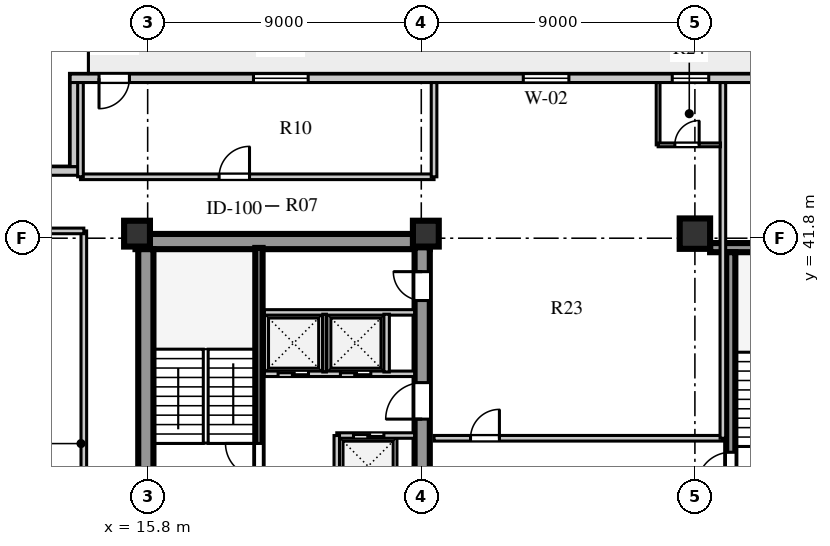
"""IFC4 building model, lengths in metres.
Left out: names, types, materials, properties, quantities, classifications, styles, units other than length and angle.
Written with IfcOpenShell. Run it as: python <this file> out.ifc"""

import sys

from ifc_helpers import new_model, si_unit, direction, frame, frame_2d, origin, origin_2d, place, context, subcontext, project, spatial, rectangle, extrude, element, fill, save


model = new_model("IFC4")
c1 = context("Model", 3, precision=1e-05, world=origin(), true_north=direction((0.0, 1.0)))
c2 = subcontext(c1, "Body", "Model", "MODEL_VIEW")
j1 = project(units=[si_unit("LENGTHUNIT", "METRE"), si_unit("PLANEANGLEUNIT", "RADIAN")], contexts=[c1])
p1 = place(None, origin())
s1 = spatial("IfcSite", under=j1, at=p1, CompositionType="ELEMENT")
p2 = place(p1, origin())
s2 = spatial("IfcBuilding", under=s1, at=p2, CompositionType="ELEMENT")
p3 = place(p2, frame((0.0, 0.0, 150.2)))
s3 = spatial("IfcBuildingStorey", under=s2, at=p3, CompositionType="ELEMENT", Elevation=150.2)
p4 = place(p3, frame((15.4, 41.69, 0.0), z_axis=(0.0, 0.0, 1.0), x_axis=(1.0, 0.0, 0.0)))
e1 = element("IfcWall", 1, at=p4, inside=s3, PredefinedType="SHEAR", context=c2, shape_type="SweptSolid", body=[
    extrude(rectangle(XDim=9.68, YDim=0.5, at=frame_2d((4.84, 0.0))), origin(), (0.0, 0.0, 1.0), 3.55),
])
p5 = place(p3, frame((15.74, 15.81, 0.0), z_axis=(0.0, 0.0, 1.0), x_axis=(0.0, 1.0, 0.0)))
e2 = element("IfcWall", 2, at=p5, inside=s3, PredefinedType="SHEAR", context=c2, shape_type="SweptSolid", body=[
    extrude(rectangle(XDim=25.63, YDim=0.5, at=frame_2d((12.815, 0.0))), origin(), (0.0, 0.0, 1.0), 3.55),
])
p6 = place(p3, frame((24.83, 15.74, 0.0), z_axis=(0.0, 0.0, 1.0), x_axis=(0.0, 1.0, 0.0)))
e3 = element("IfcWall", 3, at=p6, inside=s3, PredefinedType="SHEAR", context=c2, shape_type="SweptSolid", body=[
    extrude(rectangle(XDim=25.76, YDim=0.5, at=frame_2d((12.88, 0.0))), origin(), (0.0, 0.0, 1.0), 3.55),
])
p7 = place(p6, frame((1.61, 0.0, 0.0)))
e4 = element("IfcOpeningElement", 4, at=p7, cuts=e3, PredefinedType="OPENING", context=c2, shape_type="SweptSolid", body=[
    extrude(rectangle(XDim=1.2, YDim=2.1, at=frame_2d((0.6, 1.05))), frame((0.0, 0.26, 0.0), z_axis=(0.0, -1.0, 0.0), x_axis=(1.0, 0.0, 0.0)), (0.0, 0.0, 1.0), 0.52),
])
p8 = place(p6, frame((6.78, 0.0, 0.0)))
e5 = element("IfcOpeningElement", 5, at=p8, cuts=e3, PredefinedType="OPENING", context=c2, shape_type="SweptSolid", body=[
    extrude(rectangle(XDim=0.85, YDim=2.06, at=frame_2d((0.425, 1.03))), frame((0.0, 0.26, 0.0), z_axis=(0.0, -1.0, 0.0), x_axis=(1.0, 0.0, 0.0)), (0.0, 0.0, 1.0), 0.52),
])
p9 = place(p6, frame((12.11, 0.0, 0.0)))
e6 = element("IfcOpeningElement", 6, at=p9, cuts=e3, PredefinedType="OPENING", context=c2, shape_type="SweptSolid", body=[
    extrude(rectangle(XDim=1.5, YDim=2.12, at=frame_2d((0.75, 1.06))), frame((0.0, 0.26, 0.0), z_axis=(0.0, -1.0, 0.0), x_axis=(1.0, 0.0, 0.0)), (0.0, 0.0, 1.0), 0.52),
])
p10 = place(p6, frame((20.11, 0.0, 0.0)))
e7 = element("IfcOpeningElement", 7, at=p10, cuts=e3, PredefinedType="OPENING", context=c2, shape_type="SweptSolid", body=[
    extrude(rectangle(XDim=1.2, YDim=2.12, at=frame_2d((0.6, 1.06))), frame((0.0, 0.26, 0.0), z_axis=(0.0, -1.0, 0.0), x_axis=(1.0, 0.0, 0.0)), (0.0, 0.0, 1.0), 0.52),
])
p11 = place(p6, frame((24.01, 0.0, 0.0)))
e8 = element("IfcOpeningElement", 8, at=p11, cuts=e3, PredefinedType="OPENING", context=c2, shape_type="SweptSolid", body=[
    extrude(rectangle(XDim=0.95, YDim=2.1, at=frame_2d((0.475, 1.05))), frame((0.0, 0.26, 0.0), z_axis=(0.0, -1.0, 0.0), x_axis=(1.0, 0.0, 0.0)), (0.0, 0.0, 1.0), 0.52),
])
p12 = place(p3, frame((34.3, 41.49, 0.0), z_axis=(0.0, 0.0, 1.0), x_axis=(1.0, 0.0, 0.0)))
e9 = element("IfcWall", 9, at=p12, inside=s3, PredefinedType="SHEAR", context=c2, shape_type="SweptSolid", body=[
    extrude(rectangle(XDim=4.57, YDim=0.3, at=frame_2d((2.285, 0.0))), origin(), (0.0, 0.0, 1.0), 3.55),
])
p13 = place(p3, frame((34.98, 33.31, 0.0), z_axis=(0.0, 0.0, 1.0), x_axis=(0.0, 1.0, 0.0)))
e10 = element("IfcWall", 10, at=p13, inside=s3, PredefinedType="SHEAR", context=c2, shape_type="SweptSolid", body=[
    extrude(rectangle(XDim=8.03, YDim=0.3, at=frame_2d((4.015, 0.0))), origin(), (0.0, 0.0, 1.0), 3.55),
])
p14 = place(p13, frame((0.35, 0.0, 0.0)))
e11 = element("IfcOpeningElement", 11, at=p14, cuts=e10, PredefinedType="OPENING", context=c2, shape_type="SweptSolid", body=[
    extrude(rectangle(XDim=1.1, YDim=2.1, at=frame_2d((0.55, 1.05))), frame((0.0, 0.16, 0.0), z_axis=(0.0, -1.0, 0.0), x_axis=(1.0, 0.0, 0.0)), (0.0, 0.0, 1.0), 0.32),
])
for number, where, z_axis, x_axis in (
    (12, (15.45, 41.95, 0.0), (0.0, 0.0, 1.0), (1.0, 0.0, 0.0)),
    (13, (24.95, 41.95, 0.0), (0.0, 0.0, 1.0), (1.0, 0.0, 0.0)),
):
    element("IfcColumn", number, at=place(p3, frame(where, z_axis=z_axis, x_axis=x_axis)), inside=s3, PredefinedType="COLUMN", context=c2, shape_type="SweptSolid", body=[
        extrude(rectangle(XDim=0.85, YDim=0.85, at=origin_2d()), origin(), (0.0, 0.0, 1.0), 3.55),
    ])
p15 = place(p3, frame((33.8, 41.95, 0.0), z_axis=(0.0, 0.0, 1.0), x_axis=(1.0, 0.0, 0.0)))
e14 = element("IfcColumn", 14, at=p15, inside=s3, PredefinedType="COLUMN", context=c2, shape_type="SweptSolid", body=[
    extrude(rectangle(XDim=1.0, YDim=1.0, at=origin_2d()), origin(), (0.0, 0.0, 1.0), 3.55),
])
p16 = place(p3, frame((45.35, 47.06, 0.0), z_axis=(0.0, 0.0, 1.0), x_axis=(-1.0, 0.0, 0.0)))
e15 = element("IfcWall", 15, at=p16, inside=s3, PredefinedType="STANDARD", context=c2, shape_type="SweptSolid", body=[
    extrude(rectangle(XDim=32.1, YDim=0.28, at=frame_2d((16.05, 0.0))), origin(), (0.0, 0.0, 1.0), 3.55),
])
p17 = place(p16, frame((30.15, 0.0, 0.0)))
e16 = element("IfcOpeningElement", 16, at=p17, cuts=e15, PredefinedType="OPENING", context=c2, shape_type="SweptSolid", body=[
    extrude(rectangle(XDim=1.0, YDim=2.05, at=frame_2d((0.5, 1.025))), frame((0.0, 0.15, 0.0), z_axis=(0.0, -1.0, 0.0), x_axis=(1.0, 0.0, 0.0)), (0.0, 0.0, 1.0), 0.3),
])
p18 = place(p16, frame((24.27, 0.0, 0.8)))
e17 = element("IfcOpeningElement", 17, at=p18, cuts=e15, PredefinedType="OPENING", context=c2, shape_type="SweptSolid", body=[
    extrude(rectangle(XDim=1.8, YDim=2.0, at=frame_2d((0.9, 1.0))), frame((0.0, 0.15, 0.0), z_axis=(0.0, -1.0, 0.0), x_axis=(1.0, 0.0, 0.0)), (0.0, 0.0, 1.0), 0.3),
])
p19 = place(p16, frame((15.695, 0.0, 0.8)))
e18 = element("IfcOpeningElement", 18, at=p19, cuts=e15, PredefinedType="OPENING", context=c2, shape_type="SweptSolid", body=[
    extrude(rectangle(XDim=1.5, YDim=2.0, at=frame_2d((0.75, 1.0))), frame((0.0, 0.15, 0.0), z_axis=(0.0, -1.0, 0.0), x_axis=(1.0, 0.0, 0.0)), (0.0, 0.0, 1.0), 0.3),
])
p20 = place(p16, frame((11.095, 0.0, 0.8)))
e19 = element("IfcOpeningElement", 19, at=p20, cuts=e15, PredefinedType="OPENING", context=c2, shape_type="SweptSolid", body=[
    extrude(rectangle(XDim=1.2, YDim=1.75, at=frame_2d((0.6, 0.875))), frame((0.0, 0.15, 0.0), z_axis=(0.0, -1.0, 0.0), x_axis=(1.0, 0.0, 0.0)), (0.0, 0.0, 1.0), 0.3),
])
p21 = place(p16, frame((6.38, 0.0, 0.8)))
e20 = element("IfcOpeningElement", 20, at=p21, cuts=e15, PredefinedType="OPENING", context=c2, shape_type="SweptSolid", body=[
    extrude(rectangle(XDim=2.4, YDim=2.05, at=frame_2d((1.2, 1.025))), frame((0.0, 0.15, 0.0), z_axis=(0.0, -1.0, 0.0), x_axis=(1.0, 0.0, 0.0)), (0.0, 0.0, 1.0), 0.3),
])
p22 = place(p16, frame((1.27, 0.0, 0.8)))
e21 = element("IfcOpeningElement", 21, at=p22, cuts=e15, PredefinedType="OPENING", context=c2, shape_type="SweptSolid", body=[
    extrude(rectangle(XDim=2.1, YDim=1.95, at=frame_2d((1.05, 0.975))), frame((0.0, 0.15, 0.0), z_axis=(0.0, -1.0, 0.0), x_axis=(1.0, 0.0, 0.0)), (0.0, 0.0, 1.0), 0.3),
])
p23 = place(p3, frame((13.39, 46.92, 0.0), z_axis=(0.0, 0.0, 1.0), x_axis=(0.0, -1.0, 0.0)))
e22 = element("IfcWall", 22, at=p23, inside=s3, PredefinedType="STANDARD", context=c2, shape_type="SweptSolid", body=[
    extrude(rectangle(XDim=2.77, YDim=0.28, at=frame_2d((1.385, 0.0))), origin(), (0.0, 0.0, 1.0), 3.55),
])
p24 = place(p3, frame((13.53, 44.01, 0.0), z_axis=(0.0, 0.0, 1.0), x_axis=(-1.0, 0.0, 0.0)))
e23 = element("IfcWall", 23, at=p24, inside=s3, PredefinedType="STANDARD", context=c2, shape_type="SweptSolid", body=[
    extrude(rectangle(XDim=3.33, YDim=0.28, at=frame_2d((1.665, 0.0))), origin(), (0.0, 0.0, 1.0), 3.55),
])
p25 = place(p3, frame((19.46, 33.3, 0.0), z_axis=(0.0, 0.0, 1.0), x_axis=(0.0, 1.0, 0.0)))
e24 = element("IfcWall", 24, at=p25, inside=s3, PredefinedType="SHEAR", context=c2, shape_type="SweptSolid", body=[
    extrude(rectangle(XDim=8.18, YDim=0.24, at=frame_2d((4.09, 0.0))), origin(), (0.0, 0.0, 1.0), 3.85),
])
p26 = place(p25, frame((0.65, 0.0, 0.0)))
e25 = element("IfcOpeningElement", 25, at=p26, cuts=e24, PredefinedType="OPENING", context=c2, shape_type="SweptSolid", body=[
    extrude(rectangle(XDim=1.1, YDim=2.1, at=frame_2d((0.55, 1.05))), frame((0.0, 0.13, 0.0), z_axis=(0.0, -1.0, 0.0), x_axis=(1.0, 0.0, 0.0)), (0.0, 0.0, 1.0), 0.26),
])
p27 = place(p3, frame((22.02, 35.31, 0.0), z_axis=(0.0, 0.0, 1.0), x_axis=(1.0, 0.0, 0.0)))
e26 = element("IfcWall", 26, at=p27, inside=s3, PredefinedType="SOLIDWALL", context=c2, shape_type="SweptSolid", body=[
    extrude(rectangle(XDim=2.56, YDim=0.18, at=frame_2d((1.28, 0.0))), origin(), (0.0, 0.0, 1.0), 3.55),
])
p28 = place(p27, frame((0.55, 0.0, 0.0)))
e27 = element("IfcOpeningElement", 27, at=p28, cuts=e26, PredefinedType="OPENING", context=c2, shape_type="SweptSolid", body=[
    extrude(rectangle(XDim=1.0, YDim=2.1, at=frame_2d((0.5, 1.05))), frame((0.0, 0.1, 0.0), z_axis=(0.0, -1.0, 0.0), x_axis=(1.0, 0.0, 0.0)), (0.0, 0.0, 1.0), 0.2),
])
p29 = place(p3, frame((22.02, 33.3, 0.0), z_axis=(0.0, 0.0, 1.0), x_axis=(0.0, 1.0, 0.0)))
e28 = element("IfcWall", 28, at=p29, inside=s3, PredefinedType="SOLIDWALL", context=c2, shape_type="SweptSolid", body=[
    extrude(rectangle(XDim=2.01, YDim=0.18, at=frame_2d((1.005, 0.0))), origin(), (0.0, 0.0, 1.0), 3.55),
])
p30 = place(p3, frame((19.64, 37.34, 0.0), z_axis=(0.0, 0.0, 1.0), x_axis=(1.0, 0.0, 0.0)))
e29 = element("IfcWall", 29, at=p30, inside=s3, PredefinedType="SOLIDWALL", context=c2, shape_type="SweptSolid", body=[
    extrude(rectangle(XDim=4.94, YDim=0.18, at=frame_2d((2.47, 0.0))), origin(), (0.0, 0.0, 1.0), 3.55),
])
p31 = place(p30, frame((0.45, 0.0, 0.0)))
e30 = element("IfcOpeningElement", 30, at=p31, cuts=e29, PredefinedType="OPENING", context=c2, shape_type="SweptSolid", body=[
    extrude(rectangle(XDim=1.0, YDim=2.1, at=frame_2d((0.5, 1.05))), frame((0.0, 0.1, 0.0), z_axis=(0.0, -1.0, 0.0), x_axis=(1.0, 0.0, 0.0)), (0.0, 0.0, 1.0), 0.2),
])
p32 = place(p30, frame((2.5, 0.0, 0.0)))
e31 = element("IfcOpeningElement", 31, at=p32, cuts=e29, PredefinedType="OPENING", context=c2, shape_type="SweptSolid", body=[
    extrude(rectangle(XDim=1.0, YDim=2.1, at=frame_2d((0.5, 1.05))), frame((0.0, 0.1, 0.0), z_axis=(0.0, -1.0, 0.0), x_axis=(1.0, 0.0, 0.0)), (0.0, 0.0, 1.0), 0.2),
])
p33 = place(p3, frame((19.64, 39.36, 0.0), z_axis=(0.0, 0.0, 1.0), x_axis=(1.0, 0.0, 0.0)))
e32 = element("IfcWall", 32, at=p33, inside=s3, PredefinedType="SOLIDWALL", context=c2, shape_type="SweptSolid", body=[
    extrude(rectangle(XDim=4.94, YDim=0.18, at=frame_2d((2.47, 0.0))), origin(), (0.0, 0.0, 1.0), 3.55),
])
p34 = place(p3, frame((21.62, 37.4, 0.0), z_axis=(0.0, 0.0, 1.0), x_axis=(0.0, 1.0, 0.0)))
e33 = element("IfcWall", 33, at=p34, inside=s3, PredefinedType="PARTITIONING", context=c2, shape_type="SweptSolid", body=[
    extrude(rectangle(XDim=1.9, YDim=0.12, at=frame_2d((0.95, 0.0))), origin(), (0.0, 0.0, 1.0), 3.55),
])
p35 = place(p3, frame((23.66, 37.4, 0.0), z_axis=(0.0, 0.0, 1.0), x_axis=(0.0, 1.0, 0.0)))
e34 = element("IfcWall", 34, at=p35, inside=s3, PredefinedType="SOLIDWALL", context=c2, shape_type="SweptSolid", body=[
    extrude(rectangle(XDim=1.9, YDim=0.18, at=frame_2d((0.95, 0.0))), origin(), (0.0, 0.0, 1.0), 3.55),
])
p36 = place(p3, frame((25.22, 35.22, 0.0), z_axis=(0.0, 0.0, 1.0), x_axis=(1.0, 0.0, 0.0)))
e35 = element("IfcWall", 35, at=p36, inside=s3, PredefinedType="SOLIDWALL", context=c2, shape_type="SweptSolid", body=[
    extrude(rectangle(XDim=9.5, YDim=0.185, at=frame_2d((4.75, 0.0))), origin(), (0.0, 0.0, 1.0), 3.55),
])
p37 = place(p36, frame((1.2, 0.0, 0.0)))
e36 = element("IfcOpeningElement", 36, at=p37, cuts=e35, PredefinedType="OPENING", context=c2, shape_type="SweptSolid", body=[
    extrude(rectangle(XDim=0.95, YDim=2.1, at=frame_2d((0.475, 1.05))), frame((0.0, 0.103, 0.0), z_axis=(0.0, -1.0, 0.0), x_axis=(1.0, 0.0, 0.0)), (0.0, 0.0, 1.0), 0.205),
])
p38 = place(p3, frame((13.7, 15.16, 0.0), z_axis=(0.0, 0.0, 1.0), x_axis=(0.0, 1.0, 0.0)))
e37 = element("IfcWall", 37, at=p38, inside=s3, PredefinedType="SOLIDWALL", context=c2, shape_type="SweptSolid", body=[
    extrude(rectangle(XDim=26.88, YDim=0.185, at=frame_2d((13.44, 0.0))), origin(), (0.0, 0.0, 1.0), 3.55),
])
p39 = place(p38, frame((0.91, 0.0, 0.0)))
e38 = element("IfcOpeningElement", 38, at=p39, cuts=e37, PredefinedType="OPENING", context=c2, shape_type="SweptSolid", body=[
    extrude(rectangle(XDim=0.95, YDim=2.1, at=frame_2d((0.475, 1.05))), frame((0.0, 0.103, 0.0), z_axis=(0.0, -1.0, 0.0), x_axis=(1.0, 0.0, 0.0)), (0.0, 0.0, 1.0), 0.205),
])
p40 = place(p38, frame((11.79, 0.0, 0.0)))
e39 = element("IfcOpeningElement", 39, at=p40, cuts=e37, PredefinedType="OPENING", context=c2, shape_type="SweptSolid", body=[
    extrude(rectangle(XDim=0.95, YDim=2.1, at=frame_2d((0.475, 1.05))), frame((0.0, 0.103, 0.0), z_axis=(0.0, -1.0, 0.0), x_axis=(1.0, 0.0, 0.0)), (0.0, 0.0, 1.0), 0.205),
])
p41 = place(p3, frame((10.48, 42.04, 0.0), z_axis=(0.0, 0.0, 1.0), x_axis=(1.0, 0.0, 0.0)))
e40 = element("IfcWall", 40, at=p41, inside=s3, PredefinedType="SOLIDWALL", context=c2, shape_type="SweptSolid", body=[
    extrude(rectangle(XDim=3.22, YDim=0.185, at=frame_2d((1.61, 0.0))), origin(), (0.0, 0.0, 1.0), 3.05),
])
p42 = place(p3, frame((13.59, 43.82, 0.0), z_axis=(0.0, 0.0, 1.0), x_axis=(1.0, 0.0, 0.0)))
e41 = element("IfcWall", 41, at=p42, inside=s3, PredefinedType="SOLIDWALL", context=c2, shape_type="SweptSolid", body=[
    extrude(rectangle(XDim=11.63, YDim=0.185, at=frame_2d((5.815, 0.0))), origin(), (0.0, 0.0, 1.0), 3.55),
])
p43 = place(p42, frame((4.56, 0.0, 0.0)))
e42 = element("IfcOpeningElement", 42, at=p43, cuts=e41, PredefinedType="OPENING", context=c2, shape_type="SweptSolid", body=[
    extrude(rectangle(XDim=1.0, YDim=2.08, at=frame_2d((0.5, 1.04))), frame((0.0, 0.103, 0.0), z_axis=(0.0, -1.0, 0.0), x_axis=(1.0, 0.0, 0.0)), (0.0, 0.0, 1.0), 0.205),
])
p44 = place(p3, frame((13.59, 43.82, 0.0), z_axis=(0.0, 0.0, 1.0), x_axis=(0.0, 1.0, 0.0)))
e43 = element("IfcWall", 43, at=p44, inside=s3, PredefinedType="SOLIDWALL", context=c2, shape_type="SweptSolid", body=[
    extrude(rectangle(XDim=3.1, YDim=0.185, at=frame_2d((1.55, 0.0))), origin(), (0.0, 0.0, 1.0), 3.55),
])
p45 = place(p3, frame((25.22, 43.82, 0.0), z_axis=(0.0, 0.0, 1.0), x_axis=(0.0, 1.0, 0.0)))
e44 = element("IfcWall", 44, at=p45, inside=s3, PredefinedType="SOLIDWALL", context=c2, shape_type="SweptSolid", body=[
    extrude(rectangle(XDim=3.1, YDim=0.185, at=frame_2d((1.55, 0.0))), origin(), (0.0, 0.0, 1.0), 3.05),
])
p46 = place(p3, frame((34.72, 35.22, 0.0), z_axis=(0.0, 0.0, 1.0), x_axis=(0.0, 1.0, 0.0)))
e45 = element("IfcWall", 45, at=p46, inside=s3, PredefinedType="SOLIDWALL", context=c2, shape_type="SweptSolid", body=[
    extrude(rectangle(XDim=11.7, YDim=0.185, at=frame_2d((5.85, 0.0))), origin(), (0.0, 0.0, 1.0), 3.55),
])
p47 = place(p3, frame((32.59, 44.87, 0.0), z_axis=(0.0, 0.0, 1.0), x_axis=(0.0, 1.0, 0.0)))
e46 = element("IfcWall", 46, at=p47, inside=s3, PredefinedType="PLUMBINGWALL", context=c2, shape_type="SweptSolid", body=[
    extrude(rectangle(XDim=2.05, YDim=0.125, at=frame_2d((1.025, 0.0))), origin(), (0.0, 0.0, 1.0), 3.55),
])
p48 = place(p3, frame((32.59, 44.87, 0.0), z_axis=(0.0, 0.0, 1.0), x_axis=(1.0, 0.0, 0.0)))
e47 = element("IfcWall", 47, at=p48, inside=s3, PredefinedType="PLUMBINGWALL", context=c2, shape_type="SweptSolid", body=[
    extrude(rectangle(XDim=2.05, YDim=0.125, at=frame_2d((1.025, 0.0))), origin(), (0.0, 0.0, 1.0), 3.55),
])
p49 = place(p48, frame((0.55, 0.0, 0.0)))
e48 = element("IfcOpeningElement", 48, at=p49, cuts=e47, PredefinedType="OPENING", context=c2, shape_type="SweptSolid", body=[
    extrude(rectangle(XDim=0.8, YDim=2.05, at=frame_2d((0.4, 1.025))), frame((0.0, 0.073, 0.0), z_axis=(0.0, -1.0, 0.0), x_axis=(1.0, 0.0, 0.0)), (0.0, 0.0, 1.0), 0.145),
])
p50 = place(p17, frame((1.0, 0.0, 0.0), z_axis=(0.0, 0.0, 1.0), x_axis=(-1.0, 0.0, 0.0)))
e49 = element("IfcDoor", 49, at=p50, inside=s3, OperationType="SINGLE_SWING_LEFT", PredefinedType="DOOR", context=c2, shape_type="SweptSolid", body=[
    extrude(rectangle(XDim=1.0, YDim=2.05, at=frame_2d((0.5, 1.025))), frame((0.0, 0.025, 0.0), z_axis=(0.0, -1.0, 0.0), x_axis=(1.0, 0.0, 0.0)), (0.0, 0.0, 1.0), 0.05),
])
fill(e16, e49)
p51 = place(p18, origin())
e50 = element("IfcWindow", 50, at=p51, inside=s3, PartitioningType="SINGLE_PANEL", PredefinedType="WINDOW", context=c2, shape_type="SweptSolid", body=[
    extrude(rectangle(XDim=1.8, YDim=2.0, at=frame_2d((0.9, 1.0))), frame((0.0, 0.03, 0.0), z_axis=(0.0, -1.0, 0.0), x_axis=(1.0, 0.0, 0.0)), (0.0, 0.0, 1.0), 0.06),
])
fill(e17, e50)
p52 = place(p19, origin())
e51 = element("IfcWindow", 51, at=p52, inside=s3, PartitioningType="SINGLE_PANEL", PredefinedType="WINDOW", context=c2, shape_type="SweptSolid", body=[
    extrude(rectangle(XDim=1.5, YDim=2.0, at=frame_2d((0.75, 1.0))), frame((0.0, 0.03, 0.0), z_axis=(0.0, -1.0, 0.0), x_axis=(1.0, 0.0, 0.0)), (0.0, 0.0, 1.0), 0.06),
])
fill(e18, e51)
p53 = place(p20, origin())
e52 = element("IfcWindow", 52, at=p53, inside=s3, PartitioningType="SINGLE_PANEL", PredefinedType="WINDOW", context=c2, shape_type="SweptSolid", body=[
    extrude(rectangle(XDim=1.2, YDim=1.75, at=frame_2d((0.6, 0.875))), frame((0.0, 0.03, 0.0), z_axis=(0.0, -1.0, 0.0), x_axis=(1.0, 0.0, 0.0)), (0.0, 0.0, 1.0), 0.06),
])
fill(e19, e52)
p54 = place(p26, origin())
e53 = element("IfcDoor", 53, at=p54, inside=s3, OperationType="SINGLE_SWING_RIGHT", PredefinedType="DOOR", context=c2, shape_type="SweptSolid", body=[
    extrude(rectangle(XDim=1.1, YDim=2.1, at=frame_2d((0.55, 1.05))), frame((0.0, 0.025, 0.0), z_axis=(0.0, -1.0, 0.0), x_axis=(1.0, 0.0, 0.0)), (0.0, 0.0, 1.0), 0.05),
])
fill(e25, e53)
p55 = place(p10, frame((1.2, 0.0, 0.0), z_axis=(0.0, 0.0, 1.0), x_axis=(-1.0, 0.0, 0.0)))
e54 = element("IfcDoor", 54, at=p55, inside=s3, OperationType="SINGLE_SWING_RIGHT", PredefinedType="DOOR", context=c2, shape_type="SweptSolid", body=[
    extrude(rectangle(XDim=1.2, YDim=2.12, at=frame_2d((0.6, 1.06))), frame((0.0, 0.025, 0.0), z_axis=(0.0, -1.0, 0.0), x_axis=(1.0, 0.0, 0.0)), (0.0, 0.0, 1.0), 0.05),
])
fill(e7, e54)
p56 = place(p31, frame((1.0, 0.0, 0.0), z_axis=(0.0, 0.0, 1.0), x_axis=(-1.0, 0.0, 0.0)))
e55 = element("IfcDoor", 55, at=p56, inside=s3, OperationType="DOUBLE_DOOR_SLIDING", PredefinedType="DOOR", context=c2, shape_type="SweptSolid", body=[
    extrude(rectangle(XDim=1.0, YDim=2.1, at=frame_2d((0.5, 1.05))), frame((0.0, 0.025, 0.0), z_axis=(0.0, -1.0, 0.0), x_axis=(1.0, 0.0, 0.0)), (0.0, 0.0, 1.0), 0.05),
])
fill(e30, e55)
p57 = place(p32, frame((1.0, 0.0, 0.0), z_axis=(0.0, 0.0, 1.0), x_axis=(-1.0, 0.0, 0.0)))
e56 = element("IfcDoor", 56, at=p57, inside=s3, OperationType="DOUBLE_DOOR_SLIDING", PredefinedType="DOOR", context=c2, shape_type="SweptSolid", body=[
    extrude(rectangle(XDim=1.0, YDim=2.1, at=frame_2d((0.5, 1.05))), frame((0.0, 0.025, 0.0), z_axis=(0.0, -1.0, 0.0), x_axis=(1.0, 0.0, 0.0)), (0.0, 0.0, 1.0), 0.05),
])
fill(e31, e56)
p58 = place(p28, origin())
e57 = element("IfcDoor", 57, at=p58, inside=s3, OperationType="DOUBLE_DOOR_SLIDING", PredefinedType="DOOR", context=c2, shape_type="SweptSolid", body=[
    extrude(rectangle(XDim=1.0, YDim=2.1, at=frame_2d((0.5, 1.05))), frame((0.0, 0.025, 0.0), z_axis=(0.0, -1.0, 0.0), x_axis=(1.0, 0.0, 0.0)), (0.0, 0.0, 1.0), 0.05),
])
fill(e27, e57)
p59 = place(p11, frame((0.95, 0.0, 0.0), z_axis=(0.0, 0.0, 1.0), x_axis=(-1.0, 0.0, 0.0)))
e58 = element("IfcDoor", 58, at=p59, inside=s3, OperationType="SINGLE_SWING_LEFT", PredefinedType="DOOR", context=c2, shape_type="SweptSolid", body=[
    extrude(rectangle(XDim=0.95, YDim=2.1, at=frame_2d((0.475, 1.05))), frame((0.0, 0.025, 0.0), z_axis=(0.0, -1.0, 0.0), x_axis=(1.0, 0.0, 0.0)), (0.0, 0.0, 1.0), 0.05),
])
fill(e8, e58)
p60 = place(p14, origin())
e59 = element("IfcDoor", 59, at=p60, inside=s3, OperationType="SINGLE_SWING_LEFT", PredefinedType="DOOR", context=c2, shape_type="SweptSolid", body=[
    extrude(rectangle(XDim=1.1, YDim=2.1, at=frame_2d((0.55, 1.05))), frame((0.0, 0.025, 0.0), z_axis=(0.0, -1.0, 0.0), x_axis=(1.0, 0.0, 0.0)), (0.0, 0.0, 1.0), 0.05),
])
fill(e11, e59)
p61 = place(p43, origin())
e60 = element("IfcDoor", 60, at=p61, inside=s3, OperationType="SINGLE_SWING_RIGHT", PredefinedType="DOOR", context=c2, shape_type="SweptSolid", body=[
    extrude(rectangle(XDim=1.0, YDim=2.08, at=frame_2d((0.5, 1.04))), frame((0.0, 0.025, 0.0), z_axis=(0.0, -1.0, 0.0), x_axis=(1.0, 0.0, 0.0)), (0.0, 0.0, 1.0), 0.05),
])
fill(e42, e60)
p62 = place(p37, origin())
e61 = element("IfcDoor", 61, at=p62, inside=s3, OperationType="SINGLE_SWING_RIGHT", PredefinedType="DOOR", context=c2, shape_type="SweptSolid", body=[
    extrude(rectangle(XDim=0.95, YDim=2.1, at=frame_2d((0.475, 1.05))), frame((0.0, 0.025, 0.0), z_axis=(0.0, -1.0, 0.0), x_axis=(1.0, 0.0, 0.0)), (0.0, 0.0, 1.0), 0.05),
])
fill(e36, e61)
p63 = place(p49, frame((0.8, 0.0, 0.0), z_axis=(0.0, 0.0, 1.0), x_axis=(-1.0, 0.0, 0.0)))
e62 = element("IfcDoor", 62, at=p63, inside=s3, OperationType="SINGLE_SWING_LEFT", PredefinedType="DOOR", context=c2, shape_type="SweptSolid", body=[
    extrude(rectangle(XDim=0.8, YDim=2.05, at=frame_2d((0.4, 1.025))), frame((0.0, 0.025, 0.0), z_axis=(0.0, -1.0, 0.0), x_axis=(1.0, 0.0, 0.0)), (0.0, 0.0, 1.0), 0.05),
])
fill(e48, e62)
save(model, sys.argv[1])
